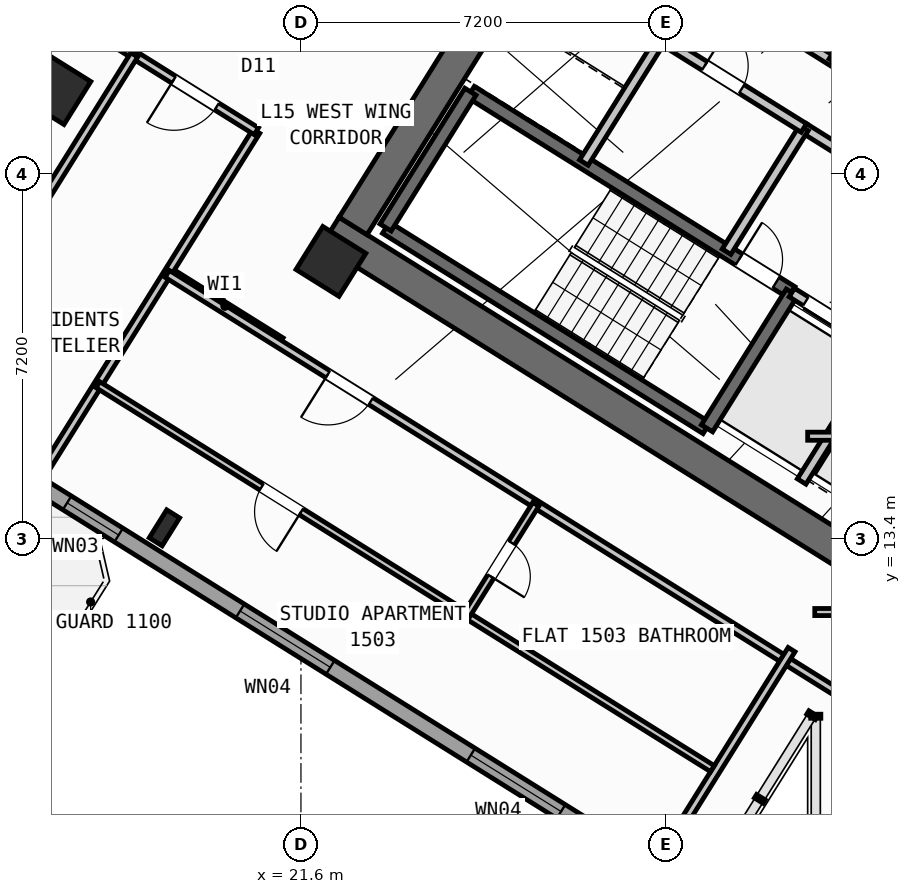
"""IFC4 building model, lengths in metres.
Left out: names, types, materials, properties, quantities, classifications, styles, units other than length and angle.
Written with IfcOpenShell. Run it as: python <this file> out.ifc"""

import sys

from ifc_helpers import new_model, si_unit, direction, frame, frame_2d, origin, origin_2d, place, context, subcontext, project, spatial, rectangle, hollow_rectangle, i_section, extrude, source, transform, mapped, element, fill, save


model = new_model("IFC4")
c1 = context("Model", 3, precision=1e-05, world=origin(), true_north=direction((0.0, 1.0)))
c2 = subcontext(c1, "Body", "Model", "MODEL_VIEW")
j1 = project(units=[si_unit("LENGTHUNIT", "METRE"), si_unit("PLANEANGLEUNIT", "RADIAN")], contexts=[c1])
p1 = place(None, origin())
s1 = spatial("IfcSite", under=j1, at=p1, CompositionType="ELEMENT")
p2 = place(p1, origin())
s2 = spatial("IfcBuilding", under=s1, at=p2, CompositionType="ELEMENT")
p3 = place(p2, frame((0.0, 0.0, 60.0)))
s3 = spatial("IfcBuildingStorey", under=s2, at=p3, CompositionType="ELEMENT", Elevation=60.0)
p4 = place(p3, frame((33.409, 12.45, 0.0), z_axis=(0.0, 0.0, 1.0), x_axis=(-0.848051132073, 0.529914405721, 0.0)))
e1 = element("IfcWall", 1, at=p4, inside=s3, PredefinedType="SHEAR", context=c2, shape_type="SweptSolid", body=[
    extrude(rectangle(XDim=13.24, YDim=0.65, at=frame_2d((6.62, 0.0))), origin(), (0.0, 0.0, 1.0), 3.35),
])
p5 = place(p3, frame((26.007, 24.976, 0.0), z_axis=(0.0, 0.0, 1.0), x_axis=(-0.529916319127, -0.848049936456, 0.0)))
e2 = element("IfcWall", 2, at=p5, inside=s3, PredefinedType="SHEAR", context=c2, shape_type="SweptSolid", body=[
    extrude(rectangle(XDim=6.375, YDim=0.65, at=frame_2d((3.188, 0.0))), origin(), (0.0, 0.0, 1.0), 3.35),
])
m1 = source(origin(), c2, "Body", "SweptSolid", [
    extrude(hollow_rectangle(XDim=1.0, YDim=1.0, WallThickness=0.04, at=origin_2d()), origin(), (0.0, 0.0, 1.0), 3.6),
])
p6 = place(p3, frame((22.191, 18.87, 0.0), z_axis=(0.0, 0.0, 1.0), x_axis=(-0.848048096156, 0.529919264233, 0.0)))
e3 = element("IfcColumn", 3, at=p6, inside=s3, PredefinedType="COLUMN", context=c2, shape_type="MappedRepresentation", body=[
    mapped(m1, transform((0.0, 0.0, 0.0), scale=1.0)),
])
m2 = source(origin(), c2, "Body", "SweptSolid", [
    extrude(i_section(OverallWidth=0.3, OverallDepth=0.65, WebThickness=0.016, FlangeThickness=0.031, at=origin_2d()), origin(), (0.0, 0.0, 1.0), 3.6),
])
p7 = place(p3, frame((18.906, 13.612, 0.0), z_axis=(0.0, 0.0, 1.0), x_axis=(-0.848048096156, 0.529919264233, 0.0)))
e4 = element("IfcColumn", 4, at=p7, inside=s3, PredefinedType="COLUMN", context=c2, shape_type="MappedRepresentation", body=[
    mapped(m2, transform((0.0, 0.0, 0.0), scale=1.0)),
])
p8 = place(p3, frame((16.764, 22.261, 0.0), z_axis=(0.0, 0.0, 1.0), x_axis=(-0.848048096156, 0.529919264233, 0.0)))
e5 = element("IfcColumn", 5, at=p8, inside=s3, PredefinedType="COLUMN", context=c2, shape_type="MappedRepresentation", body=[
    mapped(m1, transform((0.0, 0.0, 0.0), scale=1.0)),
])
p9 = place(p3, frame((29.268, 6.429, 0.0), z_axis=(0.0, 0.0, 1.0), x_axis=(-0.848049971435, 0.529916263149, 0.0)))
e6 = element("IfcWall", 6, at=p9, inside=s3, PredefinedType="STANDARD", context=c2, shape_type="SweptSolid", body=[
    extrude(rectangle(XDim=31.588, YDim=0.32, at=frame_2d((15.794, 0.0))), origin(), (0.0, 0.0, 1.0), 3.35),
])
p10 = place(p9, frame((16.235, 0.0, 0.0)))
e7 = element("IfcOpeningElement", 7, at=p10, cuts=e6, PredefinedType="OPENING", context=c2, shape_type="SweptSolid", body=[
    extrude(rectangle(XDim=1.2, YDim=2.15, at=frame_2d((0.6, 1.075))), frame((0.0, 0.17, 0.0), z_axis=(0.0, -1.0, 0.0), x_axis=(1.0, 0.0, 0.0)), (0.0, 0.0, 1.0), 0.34),
])
p11 = place(p9, frame((2.989, 0.0, 0.8)))
e8 = element("IfcOpeningElement", 8, at=p11, cuts=e6, PredefinedType="OPENING", context=c2, shape_type="SweptSolid", body=[
    extrude(rectangle(XDim=2.1, YDim=1.55, at=frame_2d((1.05, 0.775))), frame((0.0, 0.17, 0.0), z_axis=(0.0, -1.0, 0.0), x_axis=(1.0, 0.0, 0.0)), (0.0, 0.0, 1.0), 0.34),
])
p12 = place(p9, frame((8.359, 0.0, 0.8)))
e9 = element("IfcOpeningElement", 9, at=p12, cuts=e6, PredefinedType="OPENING", context=c2, shape_type="SweptSolid", body=[
    extrude(rectangle(XDim=2.1, YDim=1.55, at=frame_2d((1.05, 0.775))), frame((0.0, 0.17, 0.0), z_axis=(0.0, -1.0, 0.0), x_axis=(1.0, 0.0, 0.0)), (0.0, 0.0, 1.0), 0.34),
])
p13 = place(p9, frame((13.284, 0.0, 0.95)))
e10 = element("IfcOpeningElement", 10, at=p13, cuts=e6, PredefinedType="OPENING", context=c2, shape_type="SweptSolid", body=[
    extrude(rectangle(XDim=1.2, YDim=1.4, at=frame_2d((0.6, 0.7))), frame((0.0, 0.17, 0.0), z_axis=(0.0, -1.0, 0.0), x_axis=(1.0, 0.0, 0.0)), (0.0, 0.0, 1.0), 0.34),
])
p14 = place(p9, frame((22.374, 0.0, 0.95)))
e11 = element("IfcOpeningElement", 11, at=p14, cuts=e6, PredefinedType="OPENING", context=c2, shape_type="SweptSolid", body=[
    extrude(rectangle(XDim=1.2, YDim=1.4, at=frame_2d((0.6, 0.7))), frame((0.0, 0.17, 0.0), z_axis=(0.0, -1.0, 0.0), x_axis=(1.0, 0.0, 0.0)), (0.0, 0.0, 1.0), 0.34),
])
p15 = place(p9, frame((26.351, 0.0, 1.0)))
e12 = element("IfcOpeningElement", 12, at=p15, cuts=e6, PredefinedType="OPENING", context=c2, shape_type="SweptSolid", body=[
    extrude(rectangle(XDim=0.9, YDim=1.25, at=frame_2d((0.45, 0.625))), frame((0.0, 0.17, 0.0), z_axis=(0.0, -1.0, 0.0), x_axis=(1.0, 0.0, 0.0)), (0.0, 0.0, 1.0), 0.34),
])
p16 = place(p9, frame((29.052, 0.0, 0.85)))
e13 = element("IfcOpeningElement", 13, at=p16, cuts=e6, PredefinedType="OPENING", context=c2, shape_type="SweptSolid", body=[
    extrude(rectangle(XDim=1.8, YDim=1.5, at=frame_2d((0.9, 0.75))), frame((0.0, 0.17, 0.0), z_axis=(0.0, -1.0, 0.0), x_axis=(1.0, 0.0, 0.0)), (0.0, 0.0, 1.0), 0.34),
])
p17 = place(p3, frame((29.605, 15.581, 0.0), z_axis=(0.0, 0.0, 1.0), x_axis=(-0.848036911448, 0.529937163087, 0.0)))
e14 = element("IfcWall", 14, at=p17, inside=s3, PredefinedType="SHEAR", context=c2, shape_type="SweptSolid", body=[
    extrude(rectangle(XDim=7.46, YDim=0.26, at=frame_2d((3.73, 0.0))), origin(), (0.0, 0.0, 1.0), 3.35),
])
p18 = place(p3, frame((31.28, 18.261, 0.0), z_axis=(0.0, 0.0, 1.0), x_axis=(-0.848051618787, 0.529913626805, 0.0)))
e15 = element("IfcWall", 15, at=p18, inside=s3, PredefinedType="SHEAR", context=c2, shape_type="SweptSolid", body=[
    extrude(rectangle(XDim=7.46, YDim=0.26, at=frame_2d((3.73, 0.0))), origin(), (0.0, 0.0, 1.0), 3.35),
])
p19 = place(p18, frame((0.36, 0.0, 0.0)))
e16 = element("IfcOpeningElement", 16, at=p19, cuts=e15, PredefinedType="OPENING", context=c2, shape_type="SweptSolid", body=[
    extrude(rectangle(XDim=0.86, YDim=2.05, at=frame_2d((0.43, 1.025))), frame((0.0, 0.14, 0.0), z_axis=(0.0, -1.0, 0.0), x_axis=(1.0, 0.0, 0.0)), (0.0, 0.0, 1.0), 0.28),
])
p20 = place(p3, frame((31.288, 18.256, 0.0), z_axis=(0.0, 0.0, 1.0), x_axis=(-0.529943379326, -0.848033026897, 0.0)))
e17 = element("IfcWall", 17, at=p20, inside=s3, PredefinedType="SHEAR", context=c2, shape_type="SweptSolid", body=[
    extrude(rectangle(XDim=3.16, YDim=0.26, at=frame_2d((1.58, 0.0))), origin(), (0.0, 0.0, 1.0), 3.35),
])
p21 = place(p3, frame((24.945, 22.22, 0.0), z_axis=(0.0, 0.0, 1.0), x_axis=(-0.529908658664, -0.84805472316, 0.0)))
e18 = element("IfcWall", 18, at=p21, inside=s3, PredefinedType="SHEAR", context=c2, shape_type="SweptSolid", body=[
    extrude(rectangle(XDim=3.16, YDim=0.26, at=frame_2d((1.58, 0.0))), origin(), (0.0, 0.0, 1.0), 3.35),
])
p22 = place(p3, frame((38.046, 21.108, 0.0), z_axis=(0.0, 0.0, 1.0), x_axis=(-0.848054434086, 0.529909121291, 0.0)))
e19 = element("IfcWall", 19, at=p22, inside=s3, PredefinedType="SHEAR", context=c2, shape_type="SweptSolid", body=[
    extrude(rectangle(XDim=7.33, YDim=0.26, at=frame_2d((3.665, 0.0))), origin(), (0.0, 0.0, 1.0), 3.35),
])
p23 = place(p22, frame((0.22, 0.0, 0.0)))
e20 = element("IfcOpeningElement", 20, at=p23, cuts=e19, PredefinedType="OPENING", context=c2, shape_type="SweptSolid", body=[
    extrude(rectangle(XDim=1.1, YDim=2.1, at=frame_2d((0.55, 1.05))), frame((0.0, 0.14, 0.0), z_axis=(0.0, -1.0, 0.0), x_axis=(1.0, 0.0, 0.0)), (0.0, 0.0, 1.0), 0.28),
])
p24 = place(p3, frame((34.848, 16.031, 0.0), z_axis=(0.0, 0.0, 1.0), x_axis=(-0.848044042236, 0.529925751807, 0.0)))
e21 = element("IfcWall", 21, at=p24, inside=s3, PredefinedType="STANDARD", context=c2, shape_type="SweptSolid", body=[
    extrude(rectangle(XDim=4.198, YDim=0.2, at=frame_2d((2.099, 0.0))), origin(), (0.0, 0.0, 1.0), 3.34),
])
p25 = place(p24, frame((0.348, 0.0, 0.0)))
e22 = element("IfcOpeningElement", 22, at=p25, cuts=e21, PredefinedType="OPENING", context=c2, shape_type="SweptSolid", body=[
    extrude(rectangle(XDim=1.3, YDim=2.2, at=frame_2d((0.65, 1.1))), frame((0.0, 0.11, 0.0), z_axis=(0.0, -1.0, 0.0), x_axis=(1.0, 0.0, 0.0)), (0.0, 0.0, 1.0), 0.22),
])
p26 = place(p24, frame((2.423, 0.0, 0.0)))
e23 = element("IfcOpeningElement", 23, at=p26, cuts=e21, PredefinedType="OPENING", context=c2, shape_type="SweptSolid", body=[
    extrude(rectangle(XDim=1.45, YDim=2.25, at=frame_2d((0.725, 1.125))), frame((0.0, 0.11, 0.0), z_axis=(0.0, -1.0, 0.0), x_axis=(1.0, 0.0, 0.0)), (0.0, 0.0, 1.0), 0.22),
])
p27 = place(p3, frame((36.374, 18.474, 0.0), z_axis=(0.0, 0.0, 1.0), x_axis=(-0.848051071577, 0.529914502535, 0.0)))
e24 = element("IfcWall", 24, at=p27, inside=s3, PredefinedType="STANDARD", context=c2, shape_type="SweptSolid", body=[
    extrude(rectangle(XDim=5.718, YDim=0.2, at=frame_2d((2.859, 0.0))), origin(), (0.0, 0.0, 1.0), 3.34),
])
p28 = place(p27, frame((2.498, 0.0, 0.0)))
e25 = element("IfcOpeningElement", 25, at=p28, cuts=e24, PredefinedType="OPENING", context=c2, shape_type="SweptSolid", body=[
    extrude(rectangle(XDim=1.15, YDim=2.1, at=frame_2d((0.575, 1.05))), frame((0.0, 0.11, 0.0), z_axis=(0.0, -1.0, 0.0), x_axis=(1.0, 0.0, 0.0)), (0.0, 0.0, 1.0), 0.22),
])
p29 = place(p3, frame((32.108, 22.814, 0.0), z_axis=(0.0, 0.0, 1.0), x_axis=(-0.848042229521, 0.529928652696, 0.0)))
e26 = element("IfcWall", 26, at=p29, inside=s3, PredefinedType="STANDARD", context=c2, shape_type="SweptSolid", body=[
    extrude(rectangle(XDim=5.62, YDim=0.2, at=frame_2d((2.81, 0.0))), origin(), (0.0, 0.0, 1.0), 3.34),
])
p30 = place(p3, frame((32.982, 24.213, 0.0), z_axis=(0.0, 0.0, 1.0), x_axis=(-0.529839334948, -0.84809803628, 0.0)))
e27 = element("IfcWall", 27, at=p30, inside=s3, PredefinedType="STANDARD", context=c2, shape_type="SweptSolid", body=[
    extrude(rectangle(XDim=1.65, YDim=0.2, at=frame_2d((0.825, 0.0))), origin(), (0.0, 0.0, 1.0), 3.34),
])
p31 = place(p3, frame((33.029, 17.003, 0.0), z_axis=(0.0, 0.0, 1.0), x_axis=(-0.529916267533, -0.848049968695, 0.0)))
e28 = element("IfcWall", 28, at=p31, inside=s3, PredefinedType="STANDARD", context=c2, shape_type="SweptSolid", body=[
    extrude(rectangle(XDim=2.92, YDim=0.2, at=frame_2d((1.46, 0.0))), origin(), (0.0, 0.0, 1.0), 3.34),
])
for number, where, z_axis, x_axis in (
    (29, (31.525, 21.504, 0.0), (0.0, 0.0, 1.0), (-0.53, -0.848, 0.0)),
    (30, (28.71, 23.263, 0.0), (0.0, 0.0, 1.0), (-0.53, -0.848, 0.0)),
):
    element("IfcWall", number, at=place(p3, frame(where, z_axis=z_axis, x_axis=x_axis)), inside=s3, PredefinedType="STANDARD", context=c2, shape_type="SweptSolid", body=[
        extrude(rectangle(XDim=2.88, YDim=0.2, at=frame_2d((1.44, 0.0))), origin(), (0.0, 0.0, 1.0), 3.34),
    ])
p32 = place(p3, frame((31.525, 21.504, 0.0), z_axis=(0.0, 0.0, 1.0), x_axis=(-0.848044998614, 0.529924221305, 0.0)))
e31 = element("IfcWall", 31, at=p32, inside=s3, PredefinedType="STANDARD", context=c2, shape_type="SweptSolid", body=[
    extrude(rectangle(XDim=6.168, YDim=0.2, at=frame_2d((3.084, 0.0))), origin(), (0.0, 0.0, 1.0), 3.34),
])
p33 = place(p32, frame((4.4, 0.0, 0.0)))
e32 = element("IfcOpeningElement", 32, at=p33, cuts=e31, PredefinedType="OPENING", context=c2, shape_type="SweptSolid", body=[
    extrude(rectangle(XDim=0.86, YDim=2.05, at=frame_2d((0.43, 1.025))), frame((0.0, 0.11, 0.0), z_axis=(0.0, -1.0, 0.0), x_axis=(1.0, 0.0, 0.0)), (0.0, 0.0, 1.0), 0.22),
])
p34 = place(p32, frame((1.45, 0.0, 0.0)))
e33 = element("IfcOpeningElement", 33, at=p34, cuts=e31, PredefinedType="OPENING", context=c2, shape_type="SweptSolid", body=[
    extrude(rectangle(XDim=0.86, YDim=2.05, at=frame_2d((0.43, 1.025))), frame((0.0, 0.11, 0.0), z_axis=(0.0, -1.0, 0.0), x_axis=(1.0, 0.0, 0.0)), (0.0, 0.0, 1.0), 0.22),
])
p35 = place(p3, frame((21.206, 17.292, 0.0), z_axis=(0.0, 0.0, 1.0), x_axis=(-0.848050851465, 0.529914854792, 0.0)))
e34 = element("IfcWall", 34, at=p35, inside=s3, PredefinedType="PARTITIONING", context=c2, shape_type="SweptSolid", body=[
    extrude(rectangle(XDim=2.61, YDim=0.16, at=frame_2d((1.305, 0.0))), origin(), (0.0, 0.0, 1.0), 3.34),
])
p36 = place(p3, frame((20.719, 21.44, 0.0), z_axis=(0.0, 0.0, 1.0), x_axis=(-0.529906246318, -0.848056230514, 0.0)))
e35 = element("IfcWall", 35, at=p36, inside=s3, PredefinedType="PARTITIONING", context=c2, shape_type="SweptSolid", body=[
    extrude(rectangle(XDim=8.05, YDim=0.16, at=frame_2d((4.025, 0.0))), origin(), (0.0, 0.0, 1.0), 3.34),
])
p37 = place(p3, frame((20.719, 21.44, 0.0), z_axis=(0.0, 0.0, 1.0), x_axis=(-0.848048310262, 0.529918921593, 0.0)))
e36 = element("IfcWall", 36, at=p37, inside=s3, PredefinedType="PARTITIONING", context=c2, shape_type="SweptSolid", body=[
    extrude(rectangle(XDim=16.73, YDim=0.16, at=frame_2d((8.365, 0.0))), origin(), (0.0, 0.0, 1.0), 3.34),
])
p38 = place(p37, frame((0.92, 0.0, 0.0)))
e37 = element("IfcOpeningElement", 37, at=p38, cuts=e36, PredefinedType="OPENING", context=c2, shape_type="SweptSolid", body=[
    extrude(rectangle(XDim=1.0, YDim=2.1, at=frame_2d((0.5, 1.05))), frame((0.0, 0.09, 0.0), z_axis=(0.0, -1.0, 0.0), x_axis=(1.0, 0.0, 0.0)), (0.0, 0.0, 1.0), 0.18),
])
p39 = place(p37, frame((4.408, 0.0, 0.0)))
e38 = element("IfcOpeningElement", 38, at=p39, cuts=e36, PredefinedType="OPENING", context=c2, shape_type="SweptSolid", body=[
    extrude(rectangle(XDim=1.0, YDim=2.1, at=frame_2d((0.5, 1.05))), frame((0.0, 0.09, 0.0), z_axis=(0.0, -1.0, 0.0), x_axis=(1.0, 0.0, 0.0)), (0.0, 0.0, 1.0), 0.18),
])
p40 = place(p37, frame((7.271, 0.0, 0.0)))
e39 = element("IfcOpeningElement", 39, at=p40, cuts=e36, PredefinedType="OPENING", context=c2, shape_type="SweptSolid", body=[
    extrude(rectangle(XDim=1.0, YDim=2.1, at=frame_2d((0.5, 1.05))), frame((0.0, 0.09, 0.0), z_axis=(0.0, -1.0, 0.0), x_axis=(1.0, 0.0, 0.0)), (0.0, 0.0, 1.0), 0.18),
])
p41 = place(p37, frame((10.78, 0.0, 0.0)))
e40 = element("IfcOpeningElement", 40, at=p41, cuts=e36, PredefinedType="OPENING", context=c2, shape_type="SweptSolid", body=[
    extrude(rectangle(XDim=1.0, YDim=2.1, at=frame_2d((0.5, 1.05))), frame((0.0, 0.09, 0.0), z_axis=(0.0, -1.0, 0.0), x_axis=(1.0, 0.0, 0.0)), (0.0, 0.0, 1.0), 0.18),
])
p42 = place(p37, frame((14.372, 0.0, 0.0)))
e41 = element("IfcOpeningElement", 41, at=p42, cuts=e36, PredefinedType="OPENING", context=c2, shape_type="SweptSolid", body=[
    extrude(rectangle(XDim=1.0, YDim=2.1, at=frame_2d((0.5, 1.05))), frame((0.0, 0.09, 0.0), z_axis=(0.0, -1.0, 0.0), x_axis=(1.0, 0.0, 0.0)), (0.0, 0.0, 1.0), 0.18),
])
p43 = place(p3, frame((18.31, 22.946, 0.0), z_axis=(0.0, 0.0, 1.0), x_axis=(-0.529914428959, -0.848051117552, 0.0)))
e42 = element("IfcWall", 42, at=p43, inside=s3, PredefinedType="PARTITIONING", context=c2, shape_type="SweptSolid", body=[
    extrude(rectangle(XDim=8.05, YDim=0.16, at=frame_2d((4.025, 0.0))), origin(), (0.0, 0.0, 1.0), 3.34),
])
p44 = place(p3, frame((32.164, 10.374, 0.0), z_axis=(0.0, 0.0, 1.0), x_axis=(-0.848044107957, 0.529925646633, 0.0)))
e43 = element("IfcWall", 43, at=p44, inside=s3, PredefinedType="PARTITIONING", context=c2, shape_type="SweptSolid", body=[
    extrude(rectangle(XDim=15.57, YDim=0.16, at=frame_2d((7.785, 0.0))), origin(), (0.0, 0.0, 1.0), 3.34),
])
p45 = place(p44, frame((10.83, 0.0, 0.0)))
e44 = element("IfcOpeningElement", 44, at=p45, cuts=e43, PredefinedType="OPENING", context=c2, shape_type="SweptSolid", body=[
    extrude(rectangle(XDim=1.0, YDim=2.1, at=frame_2d((0.5, 1.05))), frame((0.0, 0.09, 0.0), z_axis=(0.0, -1.0, 0.0), x_axis=(1.0, 0.0, 0.0)), (0.0, 0.0, 1.0), 0.18),
])
p46 = place(p3, frame((31.282, 11.208, 0.0), z_axis=(0.0, 0.0, 1.0), x_axis=(-0.529938869374, -0.84803584519, 0.0)))
e45 = element("IfcWall", 45, at=p46, inside=s3, PredefinedType="PARTITIONING", context=c2, shape_type="SweptSolid", body=[
    extrude(rectangle(XDim=5.48, YDim=0.16, at=frame_2d((2.74, 0.0))), origin(), (0.0, 0.0, 1.0), 3.34),
])
p47 = place(p3, frame((29.72, 8.859, 0.0), z_axis=(0.0, 0.0, 1.0), x_axis=(-0.848049134363, 0.529917602752, 0.0)))
e46 = element("IfcWall", 46, at=p47, inside=s3, PredefinedType="PLUMBINGWALL", context=c2, shape_type="SweptSolid", body=[
    extrude(rectangle(XDim=14.3, YDim=0.14, at=frame_2d((7.15, 0.0))), origin(), (0.0, 0.0, 1.0), 3.34),
])
p48 = place(p47, frame((9.57, 0.0, 0.0)))
e47 = element("IfcOpeningElement", 47, at=p48, cuts=e46, PredefinedType="OPENING", context=c2, shape_type="SweptSolid", body=[
    extrude(rectangle(XDim=0.92, YDim=2.08, at=frame_2d((0.46, 1.04))), frame((0.0, 0.08, 0.0), z_axis=(0.0, -1.0, 0.0), x_axis=(1.0, 0.0, 0.0)), (0.0, 0.0, 1.0), 0.16),
])
p49 = place(p3, frame((26.237, 14.078, 0.0), z_axis=(0.0, 0.0, 1.0), x_axis=(-0.52995640672, -0.848024885824, 0.0)))
e48 = element("IfcWall", 48, at=p49, inside=s3, PredefinedType="PLUMBINGWALL", context=c2, shape_type="SweptSolid", body=[
    extrude(rectangle(XDim=2.58, YDim=0.14, at=frame_2d((1.29, 0.0))), origin(), (0.0, 0.0, 1.0), 3.34),
])
p50 = place(p49, frame((0.9, 0.0, 0.0)))
e49 = element("IfcOpeningElement", 49, at=p50, cuts=e48, PredefinedType="OPENING", context=c2, shape_type="SweptSolid", body=[
    extrude(rectangle(XDim=0.78, YDim=2.05, at=frame_2d((0.39, 1.025))), frame((0.0, 0.08, 0.0), z_axis=(0.0, -1.0, 0.0), x_axis=(1.0, 0.0, 0.0)), (0.0, 0.0, 1.0), 0.16),
])
p51 = place(p3, frame((31.6, 15.42, 0.0), z_axis=(0.0, 0.0, 1.0), x_axis=(1.0, 0.0, 0.0)))
e50 = element("IfcWall", 50, at=p51, inside=s3, PredefinedType="PARTITIONING", context=c2, shape_type="SweptSolid", body=[
    extrude(rectangle(XDim=2.866, YDim=0.16, at=frame_2d((1.433, 0.0))), origin(), (0.0, 0.0, 1.0), 3.34),
])
p52 = place(p3, frame((31.74, 11.95, 0.0), z_axis=(0.0, 0.0, 1.0), x_axis=(1.0, 0.0, 0.0)))
e51 = element("IfcWall", 51, at=p52, inside=s3, PredefinedType="PLUMBINGWALL", context=c2, shape_type="SweptSolid", body=[
    extrude(rectangle(XDim=0.617, YDim=0.14, at=frame_2d((0.309, 0.0))), origin(), (0.0, 0.0, 1.0), 3.34),
])
m3 = source(origin(), c2, "Body", "SweptSolid", [
    extrude(rectangle(XDim=2.1, YDim=1.55, at=frame_2d((1.05, 0.775))), frame((0.0, 0.03, 0.0), z_axis=(0.0, -1.0, 0.0), x_axis=(1.0, 0.0, 0.0)), (0.0, 0.0, 1.0), 0.06),
])
p53 = place(p11, origin())
e52 = element("IfcWindow", 52, at=p53, inside=s3, PartitioningType="SINGLE_PANEL", PredefinedType="WINDOW", context=c2, shape_type="MappedRepresentation", body=[
    mapped(m3, transform((0.0, 0.0, 0.0), scale=1.0)),
])
fill(e8, e52)
p54 = place(p12, origin())
e53 = element("IfcWindow", 53, at=p54, inside=s3, PartitioningType="SINGLE_PANEL", PredefinedType="WINDOW", context=c2, shape_type="MappedRepresentation", body=[
    mapped(m3, transform((0.0, 0.0, 0.0), scale=1.0)),
])
fill(e9, e53)
m4 = source(origin(), c2, "Body", "SweptSolid", [
    extrude(rectangle(XDim=1.2, YDim=1.4, at=frame_2d((0.6, 0.7))), frame((0.0, 0.03, 0.0), z_axis=(0.0, -1.0, 0.0), x_axis=(1.0, 0.0, 0.0)), (0.0, 0.0, 1.0), 0.06),
])
p55 = place(p13, origin())
e54 = element("IfcWindow", 54, at=p55, inside=s3, PartitioningType="SINGLE_PANEL", PredefinedType="WINDOW", context=c2, shape_type="MappedRepresentation", body=[
    mapped(m4, transform((0.0, 0.0, 0.0), scale=1.0)),
])
fill(e10, e54)
m5 = source(origin(), c2, "Body", "SweptSolid", [
    extrude(rectangle(XDim=0.86, YDim=2.05, at=frame_2d((0.43, 1.025))), frame((0.0, 0.025, 0.0), z_axis=(0.0, -1.0, 0.0), x_axis=(1.0, 0.0, 0.0)), (0.0, 0.0, 1.0), 0.05),
])
p56 = place(p19, frame((0.86, 0.0, 0.0), z_axis=(0.0, 0.0, 1.0), x_axis=(-1.0, 0.0, 0.0)))
e55 = element("IfcDoor", 55, at=p56, inside=s3, OperationType="SINGLE_SWING_LEFT", PredefinedType="DOOR", context=c2, shape_type="MappedRepresentation", body=[
    mapped(m5, transform((0.0, 0.0, 0.0), scale=1.0)),
])
fill(e16, e55)
m6 = source(origin(), c2, "Body", "SweptSolid", [
    extrude(rectangle(XDim=1.45, YDim=2.25, at=frame_2d((0.725, 1.125))), frame((0.0, 0.025, 0.0), z_axis=(0.0, -1.0, 0.0), x_axis=(1.0, 0.0, 0.0)), (0.0, 0.0, 1.0), 0.05),
])
p57 = place(p26, origin())
e56 = element("IfcDoor", 56, at=p57, inside=s3, OperationType="DOUBLE_DOOR_SLIDING", PredefinedType="DOOR", context=c2, shape_type="MappedRepresentation", body=[
    mapped(m6, transform((0.0, 0.0, 0.0), scale=1.0)),
])
fill(e23, e56)
p58 = place(p34, frame((0.86, 0.0, 0.0), z_axis=(0.0, 0.0, 1.0), x_axis=(-1.0, 0.0, 0.0)))
e57 = element("IfcDoor", 57, at=p58, inside=s3, OperationType="SINGLE_SWING_LEFT", PredefinedType="DOOR", context=c2, shape_type="MappedRepresentation", body=[
    mapped(m5, transform((0.0, 0.0, 0.0), scale=1.0)),
])
fill(e33, e57)
m7 = source(origin(), c2, "Body", "SweptSolid", [
    extrude(rectangle(XDim=1.0, YDim=2.1, at=frame_2d((0.5, 1.05))), frame((0.0, 0.025, 0.0), z_axis=(0.0, -1.0, 0.0), x_axis=(1.0, 0.0, 0.0)), (0.0, 0.0, 1.0), 0.05),
])
p59 = place(p38, origin())
e58 = element("IfcDoor", 58, at=p59, inside=s3, OperationType="SINGLE_SWING_RIGHT", PredefinedType="DOOR", context=c2, shape_type="MappedRepresentation", body=[
    mapped(m7, transform((0.0, 0.0, 0.0), scale=1.0)),
])
fill(e37, e58)
p60 = place(p45, origin())
e59 = element("IfcDoor", 59, at=p60, inside=s3, OperationType="SINGLE_SWING_RIGHT", PredefinedType="DOOR", context=c2, shape_type="MappedRepresentation", body=[
    mapped(m7, transform((0.0, 0.0, 0.0), scale=1.0)),
])
fill(e44, e59)
m8 = source(origin(), c2, "Body", "SweptSolid", [
    extrude(rectangle(XDim=0.92, YDim=2.08, at=frame_2d((0.46, 1.04))), frame((0.0, 0.025, 0.0), z_axis=(0.0, -1.0, 0.0), x_axis=(1.0, 0.0, 0.0)), (0.0, 0.0, 1.0), 0.05),
])
p61 = place(p48, origin())
e60 = element("IfcDoor", 60, at=p61, inside=s3, OperationType="SINGLE_SWING_LEFT", PredefinedType="DOOR", context=c2, shape_type="MappedRepresentation", body=[
    mapped(m8, transform((0.0, 0.0, 0.0), scale=1.0)),
])
fill(e47, e60)
m9 = source(origin(), c2, "Body", "SweptSolid", [
    extrude(rectangle(XDim=0.78, YDim=2.05, at=frame_2d((0.39, 1.025))), frame((0.0, 0.025, 0.0), z_axis=(0.0, -1.0, 0.0), x_axis=(1.0, 0.0, 0.0)), (0.0, 0.0, 1.0), 0.05),
])
p62 = place(p50, origin())
e61 = element("IfcDoor", 61, at=p62, inside=s3, OperationType="SINGLE_SWING_RIGHT", PredefinedType="DOOR", context=c2, shape_type="MappedRepresentation", body=[
    mapped(m9, transform((0.0, 0.0, 0.0), scale=1.0)),
])
fill(e49, e61)
save(model, sys.argv[1])
